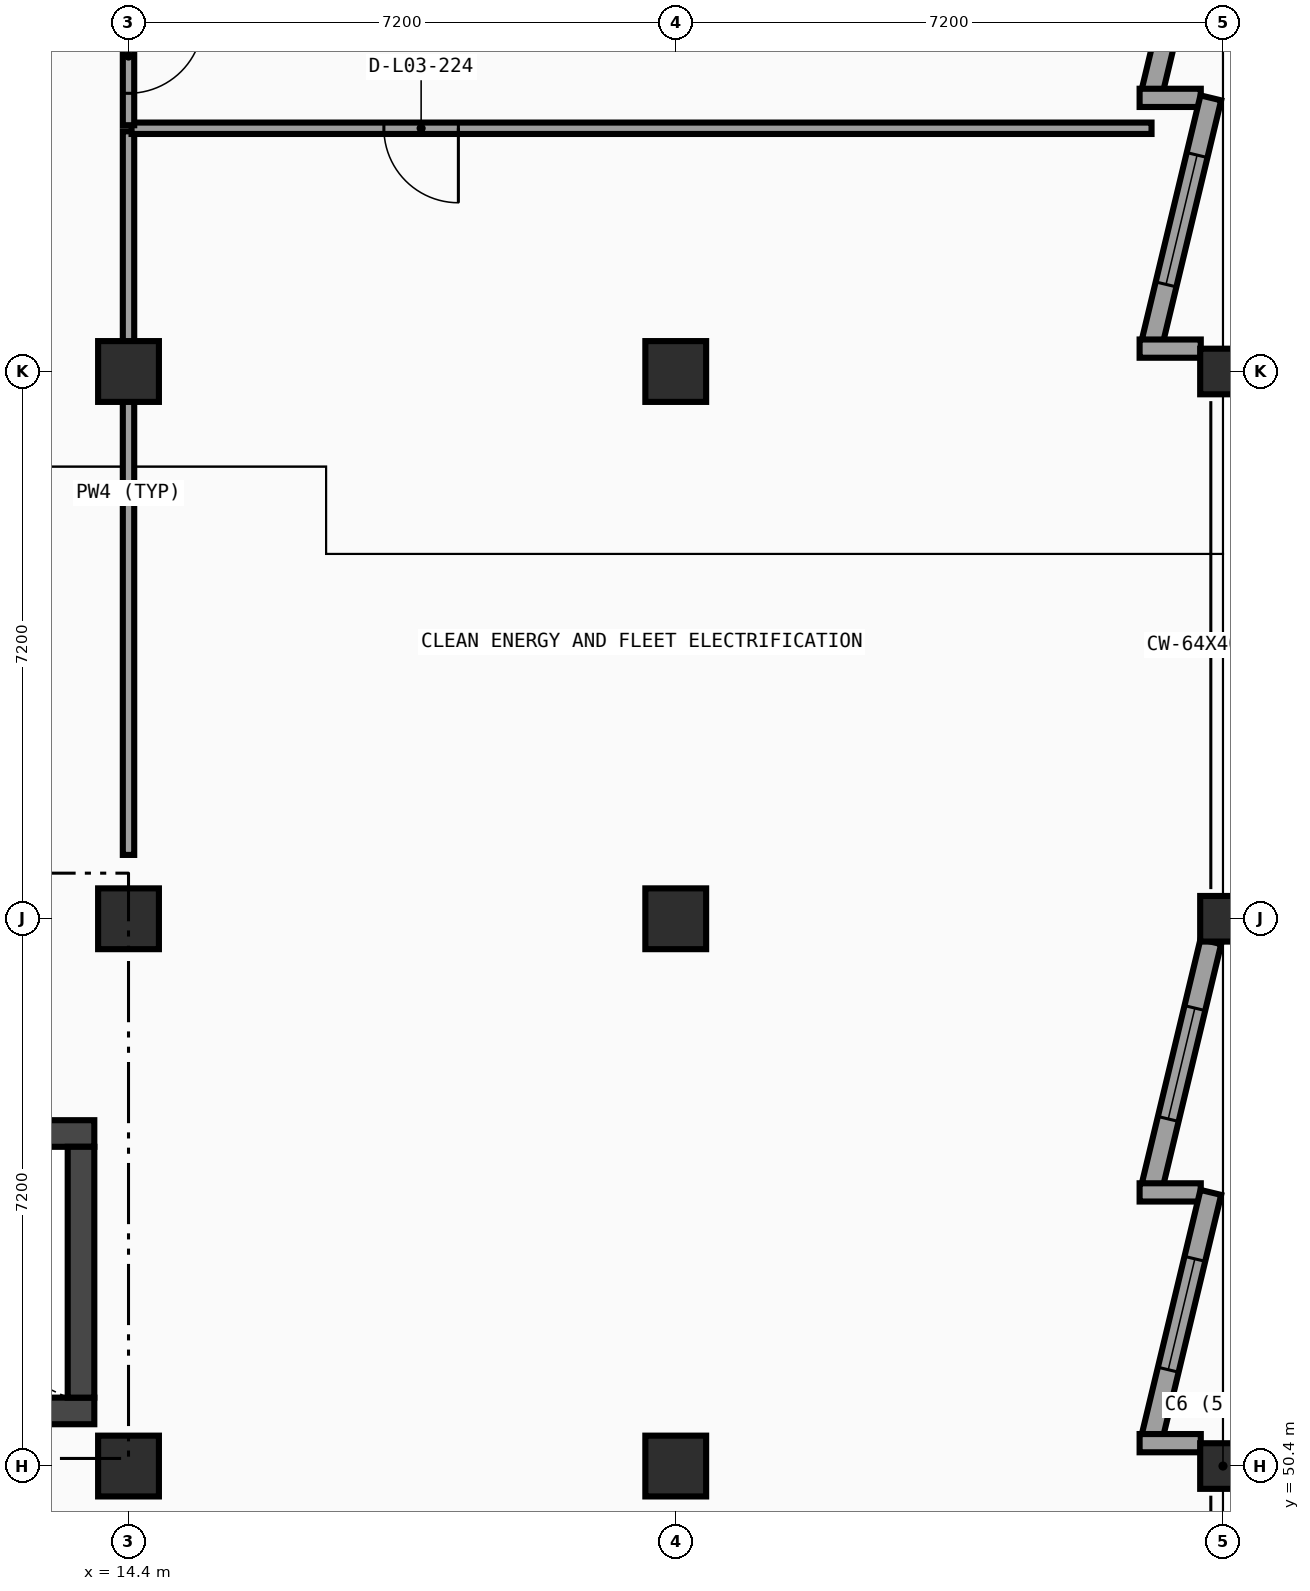
"""IFC4 building model, lengths in metres.
Left out: names, types, materials, properties, quantities, classifications, styles, units other than length and angle.
Written with IfcOpenShell. Run it as: python <this file> out.ifc"""

import sys

from ifc_helpers import new_model, si_unit, direction, frame, frame_2d, origin, origin_2d, place, context, subcontext, project, spatial, rectangle, extrude, element, fill, save


model = new_model("IFC4")
c1 = context("Model", 3, precision=1e-05, world=origin(), true_north=direction((0.0, 1.0)))
c2 = subcontext(c1, "Body", "Model", "MODEL_VIEW")
j1 = project(units=[si_unit("LENGTHUNIT", "METRE"), si_unit("PLANEANGLEUNIT", "RADIAN")], contexts=[c1])
p1 = place(None, origin())
s1 = spatial("IfcSite", under=j1, at=p1, CompositionType="ELEMENT")
p2 = place(p1, origin())
s2 = spatial("IfcBuilding", under=s1, at=p2, CompositionType="ELEMENT")
p3 = place(p2, frame((0.0, 0.0, 14.7)))
s3 = spatial("IfcBuildingStorey", under=s2, at=p3, CompositionType="ELEMENT", Elevation=14.7)
for number, where, z_axis, x_axis in (
    (1, (14.4, 50.4, 0.0), (0.0, 0.0, 1.0), (1.0, 0.0, 0.0)),
    (2, (14.4, 57.6, 0.0), (0.0, 0.0, 1.0), (1.0, 0.0, 0.0)),
    (3, (14.4, 64.8, 0.0), (0.0, 0.0, 1.0), (1.0, 0.0, 0.0)),
    (4, (21.6, 50.4, 0.0), (0.0, 0.0, 1.0), (1.0, 0.0, 0.0)),
    (5, (21.6, 57.6, 0.0), (0.0, 0.0, 1.0), (1.0, 0.0, 0.0)),
    (6, (21.6, 64.8, 0.0), (0.0, 0.0, 1.0), (1.0, 0.0, 0.0)),
):
    element("IfcColumn", number, at=place(p3, frame(where, z_axis=z_axis, x_axis=x_axis)), inside=s3, PredefinedType="COLUMN", context=c2, shape_type="SweptSolid", body=[
        extrude(rectangle(XDim=0.8, YDim=0.8, at=origin_2d()), origin(), (0.0, 0.0, 1.0), 4.2),
    ])
for number, where, z_axis, x_axis in (
    (7, (28.8, 50.4, 0.0), (0.0, 0.0, 1.0), (1.0, 0.0, 0.0)),
    (8, (28.8, 57.6, 0.0), (0.0, 0.0, 1.0), (1.0, 0.0, 0.0)),
    (9, (28.8, 64.8, 0.0), (0.0, 0.0, 1.0), (1.0, 0.0, 0.0)),
):
    element("IfcColumn", number, at=place(p3, frame(where, z_axis=z_axis, x_axis=x_axis)), inside=s3, PredefinedType="COLUMN", context=c2, shape_type="SweptSolid", body=[
        extrude(rectangle(XDim=0.6, YDim=0.6, at=origin_2d()), origin(), (0.0, 0.0, 1.0), 4.2),
    ])
p4 = place(p3, frame((28.64, 71.699, 0.0), z_axis=(0.0, 0.0, 1.0), x_axis=(-0.23343175428, -0.972373187667, 0.0)))
e10 = element("IfcWall", 10, at=p4, inside=s3, PredefinedType="SOLIDWALL", context=c2, shape_type="SweptSolid", body=[
    extrude(rectangle(XDim=3.298, YDim=0.28, at=frame_2d((1.649, 0.0))), origin(), (0.0, 0.0, 1.0), 3.95),
])
p5 = place(p4, frame((0.774, 0.0, 0.8)))
e11 = element("IfcOpeningElement", 11, at=p5, cuts=e10, PredefinedType="OPENING", context=c2, shape_type="SweptSolid", body=[
    extrude(rectangle(XDim=1.75, YDim=2.05, at=frame_2d((0.875, 1.025))), frame((0.0, 0.15, 0.0), z_axis=(0.0, -1.0, 0.0), x_axis=(1.0, 0.0, 0.0)), (0.0, 0.0, 1.0), 0.3),
])
p6 = place(p3, frame((27.703, 68.4, 0.0), z_axis=(0.0, 0.0, 1.0), x_axis=(1.0, 0.0, 0.0)))
e12 = element("IfcWall", 12, at=p6, inside=s3, PredefinedType="SOLIDWALL", context=c2, shape_type="SweptSolid", body=[
    extrude(rectangle(XDim=0.805, YDim=0.24, at=frame_2d((0.403, 0.0))), origin(), (0.0, 0.0, 1.0), 3.95),
])
p7 = place(p3, frame((28.64, 68.4, 0.0), z_axis=(0.0, 0.0, 1.0), x_axis=(-0.23343175428, -0.972373187667, 0.0)))
e13 = element("IfcWall", 13, at=p7, inside=s3, PredefinedType="SOLIDWALL", context=c2, shape_type="SweptSolid", body=[
    extrude(rectangle(XDim=3.298, YDim=0.28, at=frame_2d((1.649, 0.0))), origin(), (0.0, 0.0, 1.0), 3.95),
])
p8 = place(p7, frame((0.774, 0.0, 0.8)))
e14 = element("IfcOpeningElement", 14, at=p8, cuts=e13, PredefinedType="OPENING", context=c2, shape_type="SweptSolid", body=[
    extrude(rectangle(XDim=1.75, YDim=2.05, at=frame_2d((0.875, 1.025))), frame((0.0, 0.15, 0.0), z_axis=(0.0, -1.0, 0.0), x_axis=(1.0, 0.0, 0.0)), (0.0, 0.0, 1.0), 0.3),
])
p9 = place(p3, frame((27.703, 65.101, 0.0), z_axis=(0.0, 0.0, 1.0), x_axis=(1.0, 0.0, 0.0)))
e15 = element("IfcWall", 15, at=p9, inside=s3, PredefinedType="SOLIDWALL", context=c2, shape_type="SweptSolid", body=[
    extrude(rectangle(XDim=0.805, YDim=0.24, at=frame_2d((0.403, 0.0))), origin(), (0.0, 0.0, 1.0), 3.95),
])
p10 = place(p3, frame((28.64, 57.299, 0.0), z_axis=(0.0, 0.0, 1.0), x_axis=(-0.233414950828, -0.972377221417, 0.0)))
e16 = element("IfcWall", 16, at=p10, inside=s3, PredefinedType="SOLIDWALL", context=c2, shape_type="SweptSolid", body=[
    extrude(rectangle(XDim=3.298, YDim=0.28, at=frame_2d((1.649, 0.0))), origin(), (0.0, 0.0, 1.0), 3.95),
])
p11 = place(p10, frame((0.899, 0.0, 0.8)))
e17 = element("IfcOpeningElement", 17, at=p11, cuts=e16, PredefinedType="OPENING", context=c2, shape_type="SweptSolid", body=[
    extrude(rectangle(XDim=1.5, YDim=1.7, at=frame_2d((0.75, 0.85))), frame((0.0, 0.15, 0.0), z_axis=(0.0, -1.0, 0.0), x_axis=(1.0, 0.0, 0.0)), (0.0, 0.0, 1.0), 0.3),
])
p12 = place(p3, frame((27.703, 54.0, 0.0), z_axis=(0.0, 0.0, 1.0), x_axis=(1.0, 0.0, 0.0)))
e18 = element("IfcWall", 18, at=p12, inside=s3, PredefinedType="SOLIDWALL", context=c2, shape_type="SweptSolid", body=[
    extrude(rectangle(XDim=0.805, YDim=0.24, at=frame_2d((0.403, 0.0))), origin(), (0.0, 0.0, 1.0), 3.95),
])
p13 = place(p3, frame((28.64, 54.0, 0.0), z_axis=(0.0, 0.0, 1.0), x_axis=(-0.23343175428, -0.972373187667, 0.0)))
e19 = element("IfcWall", 19, at=p13, inside=s3, PredefinedType="SOLIDWALL", context=c2, shape_type="SweptSolid", body=[
    extrude(rectangle(XDim=3.298, YDim=0.28, at=frame_2d((1.649, 0.0))), origin(), (0.0, 0.0, 1.0), 3.95),
])
p14 = place(p13, frame((0.899, 0.0, 0.8)))
e20 = element("IfcOpeningElement", 20, at=p14, cuts=e19, PredefinedType="OPENING", context=c2, shape_type="SweptSolid", body=[
    extrude(rectangle(XDim=1.5, YDim=1.7, at=frame_2d((0.75, 0.85))), frame((0.0, 0.15, 0.0), z_axis=(0.0, -1.0, 0.0), x_axis=(1.0, 0.0, 0.0)), (0.0, 0.0, 1.0), 0.3),
])
p15 = place(p3, frame((27.703, 50.701, 0.0), z_axis=(0.0, 0.0, 1.0), x_axis=(1.0, 0.0, 0.0)))
e21 = element("IfcWall", 21, at=p15, inside=s3, PredefinedType="SOLIDWALL", context=c2, shape_type="SweptSolid", body=[
    extrude(rectangle(XDim=0.805, YDim=0.24, at=frame_2d((0.403, 0.0))), origin(), (0.0, 0.0, 1.0), 3.95),
])
for number, where, z_axis, x_axis in (
    (22, (4.65, 51.125, 0.0), (0.0, 0.0, 1.0), (1.0, 0.0, 0.0)),
    (23, (13.95, 54.775, 0.0), (0.0, 0.0, 1.0), (-1.0, 0.0, 0.0)),
):
    element("IfcWall", number, at=place(p3, frame(where, z_axis=z_axis, x_axis=x_axis)), inside=s3, PredefinedType="SHEAR", context=c2, shape_type="SweptSolid", body=[
        extrude(rectangle(XDim=9.3, YDim=0.35, at=frame_2d((4.65, 0.0))), origin(), (0.0, 0.0, 1.0), 3.95),
    ])
p16 = place(p3, frame((13.775, 51.3, 0.0), z_axis=(0.0, 0.0, 1.0), x_axis=(0.0, 1.0, 0.0)))
e24 = element("IfcWall", 24, at=p16, inside=s3, PredefinedType="SHEAR", context=c2, shape_type="SweptSolid", body=[
    extrude(rectangle(XDim=3.3, YDim=0.35, at=frame_2d((1.65, 0.0))), origin(), (0.0, 0.0, 1.0), 3.95),
])
p17 = place(p3, frame((14.4, 58.44, 0.0), z_axis=(0.0, 0.0, 1.0), x_axis=(0.0, 1.0, 0.0)))
e25 = element("IfcWall", 25, at=p17, inside=s3, PredefinedType="PARTITIONING", context=c2, shape_type="SweptSolid", body=[
    extrude(rectangle(XDim=9.52, YDim=0.15, at=frame_2d((4.76, 0.0))), origin(), (0.0, 0.0, 1.0), 3.352),
])
p18 = place(p3, frame((14.44, 68.0, 0.0), z_axis=(0.0, 0.0, 1.0), x_axis=(1.0, 0.0, 0.0)))
e26 = element("IfcWall", 26, at=p18, inside=s3, PredefinedType="PARTITIONING", context=c2, shape_type="SweptSolid", body=[
    extrude(rectangle(XDim=13.42, YDim=0.15, at=frame_2d((6.71, 0.0))), origin(), (0.0, 0.0, 1.0), 3.352),
])
p19 = place(p18, frame((3.32, 0.0, 0.0)))
e27 = element("IfcOpeningElement", 27, at=p19, cuts=e26, PredefinedType="OPENING", context=c2, shape_type="SweptSolid", body=[
    extrude(rectangle(XDim=0.98, YDim=2.1, at=frame_2d((0.49, 1.05))), frame((0.0, 0.085, 0.0), z_axis=(0.0, -1.0, 0.0), x_axis=(1.0, 0.0, 0.0)), (0.0, 0.0, 1.0), 0.17),
])
p20 = place(p3, frame((14.4, 68.04, 0.0), z_axis=(0.0, 0.0, 1.0), x_axis=(0.0, 1.0, 0.0)))
e28 = element("IfcWall", 28, at=p20, inside=s3, PredefinedType="PARTITIONING", context=c2, shape_type="SweptSolid", body=[
    extrude(rectangle(XDim=18.32, YDim=0.15, at=frame_2d((9.16, 0.0))), origin(), (0.0, 0.0, 1.0), 3.352),
])
p21 = place(p20, frame((6.607, 0.0, 0.0)))
e29 = element("IfcOpeningElement", 29, at=p21, cuts=e28, PredefinedType="OPENING", context=c2, shape_type="SweptSolid", body=[
    extrude(rectangle(XDim=0.98, YDim=2.1, at=frame_2d((0.49, 1.05))), frame((0.0, 0.085, 0.0), z_axis=(0.0, -1.0, 0.0), x_axis=(1.0, 0.0, 0.0)), (0.0, 0.0, 1.0), 0.17),
])
p22 = place(p20, frame((0.42, 0.0, 0.0)))
e30 = element("IfcOpeningElement", 30, at=p22, cuts=e28, PredefinedType="OPENING", context=c2, shape_type="SweptSolid", body=[
    extrude(rectangle(XDim=0.98, YDim=2.1, at=frame_2d((0.49, 1.05))), frame((0.0, 0.085, 0.0), z_axis=(0.0, -1.0, 0.0), x_axis=(1.0, 0.0, 0.0)), (0.0, 0.0, 1.0), 0.17),
])
p23 = place(p8, origin())
e31 = element("IfcWindow", 31, at=p23, inside=s3, PartitioningType="SINGLE_PANEL", PredefinedType="WINDOW", context=c2, shape_type="SweptSolid", body=[
    extrude(rectangle(XDim=1.75, YDim=2.05, at=frame_2d((0.875, 1.025))), frame((0.0, 0.03, 0.0), z_axis=(0.0, -1.0, 0.0), x_axis=(1.0, 0.0, 0.0)), (0.0, 0.0, 1.0), 0.06),
])
fill(e14, e31)
p24 = place(p11, origin())
e32 = element("IfcWindow", 32, at=p24, inside=s3, PartitioningType="SINGLE_PANEL", PredefinedType="WINDOW", context=c2, shape_type="SweptSolid", body=[
    extrude(rectangle(XDim=1.5, YDim=1.7, at=frame_2d((0.75, 0.85))), frame((0.0, 0.03, 0.0), z_axis=(0.0, -1.0, 0.0), x_axis=(1.0, 0.0, 0.0)), (0.0, 0.0, 1.0), 0.06),
])
fill(e17, e32)
p25 = place(p14, origin())
e33 = element("IfcWindow", 33, at=p25, inside=s3, PartitioningType="SINGLE_PANEL", PredefinedType="WINDOW", context=c2, shape_type="SweptSolid", body=[
    extrude(rectangle(XDim=1.5, YDim=1.7, at=frame_2d((0.75, 0.85))), frame((0.0, 0.03, 0.0), z_axis=(0.0, -1.0, 0.0), x_axis=(1.0, 0.0, 0.0)), (0.0, 0.0, 1.0), 0.06),
])
fill(e20, e33)
p26 = place(p19, origin())
e34 = element("IfcDoor", 34, at=p26, inside=s3, OperationType="SINGLE_SWING_RIGHT", PredefinedType="DOOR", context=c2, shape_type="SweptSolid", body=[
    extrude(rectangle(XDim=0.98, YDim=2.1, at=frame_2d((0.49, 1.05))), frame((0.0, 0.025, 0.0), z_axis=(0.0, -1.0, 0.0), x_axis=(1.0, 0.0, 0.0)), (0.0, 0.0, 1.0), 0.05),
])
fill(e27, e34)
p27 = place(p22, origin())
e35 = element("IfcDoor", 35, at=p27, inside=s3, OperationType="SINGLE_SWING_RIGHT", PredefinedType="DOOR", context=c2, shape_type="SweptSolid", body=[
    extrude(rectangle(XDim=0.98, YDim=2.1, at=frame_2d((0.49, 1.05))), frame((0.0, 0.025, 0.0), z_axis=(0.0, -1.0, 0.0), x_axis=(1.0, 0.0, 0.0)), (0.0, 0.0, 1.0), 0.05),
])
fill(e30, e35)
save(model, sys.argv[1])
